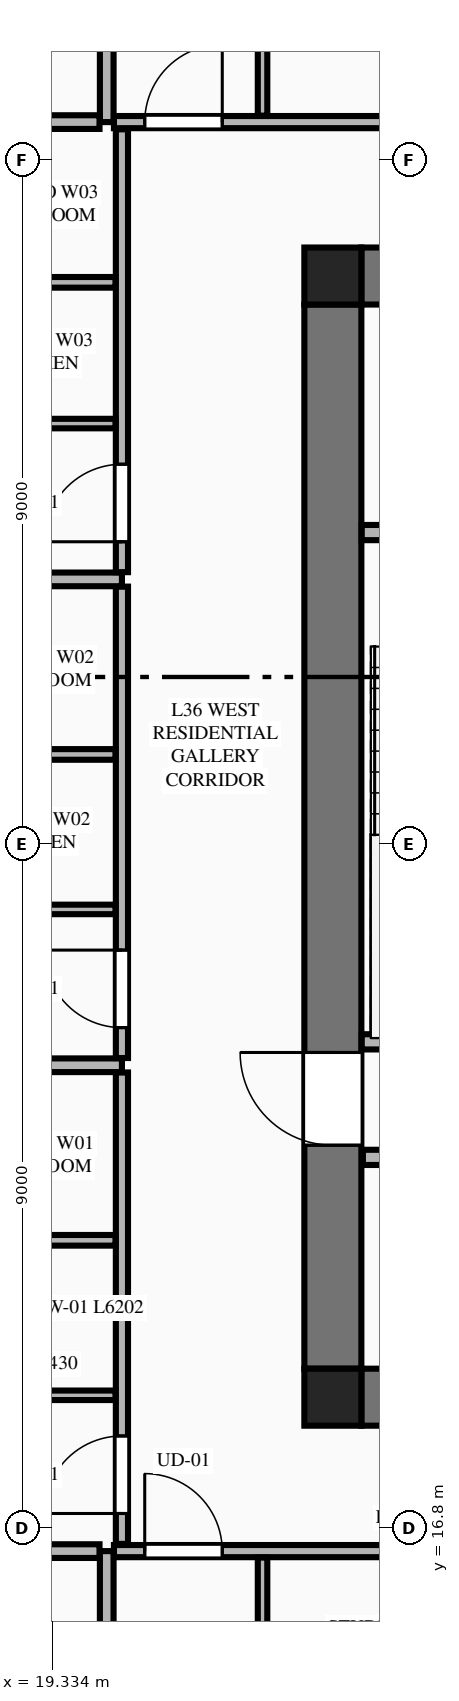
"""IFC4 building model, lengths in metres.
Left out: names, types, materials, properties, quantities, classifications, styles, units other than length and angle.
Written with IfcOpenShell. Run it as: python <this file> out.ifc"""

import sys

from ifc_helpers import new_model, si_unit, direction, frame, frame_2d, origin, origin_2d, place, context, subcontext, project, spatial, rectangle, extrude, element, fill, save


model = new_model("IFC4")
c1 = context("Model", 3, precision=1e-05, world=origin(), true_north=direction((0.0, 1.0)))
c2 = subcontext(c1, "Body", "Model", "MODEL_VIEW")
j1 = project(units=[si_unit("LENGTHUNIT", "METRE"), si_unit("PLANEANGLEUNIT", "RADIAN")], contexts=[c1])
p1 = place(None, origin())
s1 = spatial("IfcSite", under=j1, at=p1, CompositionType="ELEMENT")
p2 = place(p1, origin())
s2 = spatial("IfcBuilding", under=s1, at=p2, CompositionType="ELEMENT")
p3 = place(p2, frame((0.0, 0.0, 137.45)))
s3 = spatial("IfcBuildingStorey", under=s2, at=p3, CompositionType="ELEMENT", Elevation=137.45)
for number, where, z_axis, x_axis in (
    (1, (23.025, 18.525, 0.0), (0.0, 0.0, 1.0), (1.0, 0.0, 0.0)),
    (2, (23.025, 33.275, 0.0), (0.0, 0.0, 1.0), (1.0, 0.0, 0.0)),
):
    element("IfcColumn", number, at=place(p3, frame(where, z_axis=z_axis, x_axis=x_axis)), inside=s3, PredefinedType="COLUMN", context=c2, shape_type="SweptSolid", body=[
        extrude(rectangle(XDim=0.75, YDim=0.75, at=origin_2d()), origin(), (0.0, 0.0, 1.0), 3.55),
    ])
for number, where, z_axis, x_axis in (
    (3, (23.4, 18.525, 0.0), (0.0, 0.0, 1.0), (1.0, 0.0, 0.0)),
    (4, (23.4, 33.275, 0.0), (0.0, 0.0, 1.0), (1.0, 0.0, 0.0)),
):
    element("IfcWall", number, at=place(p3, frame(where, z_axis=z_axis, x_axis=x_axis)), inside=s3, PredefinedType="SHEAR", context=c2, shape_type="SweptSolid", body=[
        extrude(rectangle(XDim=18.0, YDim=0.75, at=frame_2d((9.0, 0.0))), origin(), (0.0, 0.0, 1.0), 3.34),
    ])
p4 = place(p3, frame((23.025, 18.9, 0.0), z_axis=(0.0, 0.0, 1.0), x_axis=(0.0, 1.0, 0.0)))
e5 = element("IfcWall", 5, at=p4, inside=s3, PredefinedType="SHEAR", context=c2, shape_type="SweptSolid", body=[
    extrude(rectangle(XDim=14.0, YDim=0.75, at=frame_2d((7.0, 0.0))), origin(), (0.0, 0.0, 1.0), 3.34),
])
p5 = place(p4, frame((2.94, 0.0, 0.0)))
e6 = element("IfcOpeningElement", 6, at=p5, cuts=e5, PredefinedType="OPENING", context=c2, shape_type="SweptSolid", body=[
    extrude(rectangle(XDim=1.22, YDim=2.25, at=frame_2d((0.61, 1.125))), frame((0.0, 0.385, 0.0), z_axis=(0.0, -1.0, 0.0), x_axis=(1.0, 0.0, 0.0)), (0.0, 0.0, 1.0), 0.77),
])
p6 = place(p3, frame((23.405, 23.2, 0.0), z_axis=(0.0, 0.0, 1.0), x_axis=(1.0, 0.0, 0.0)))
e7 = element("IfcWall", 7, at=p6, inside=s3, PredefinedType="PLUMBINGWALL", context=c2, shape_type="SweptSolid", body=[
    extrude(rectangle(XDim=3.27, YDim=0.2, at=frame_2d((1.635, 0.0))), origin(), (0.0, 0.0, 1.0), 3.34),
])
p7 = place(p3, frame((23.405, 29.9, 0.0), z_axis=(0.0, 0.0, 1.0), x_axis=(1.0, 0.0, 0.0)))
e8 = element("IfcWall", 8, at=p7, inside=s3, PredefinedType="PLUMBINGWALL", context=c2, shape_type="SweptSolid", body=[
    extrude(rectangle(XDim=3.27, YDim=0.2, at=frame_2d((1.635, 0.0))), origin(), (0.0, 0.0, 1.0), 3.34),
])
p8 = place(p7, frame((1.85, 0.0, 0.0)))
e9 = element("IfcOpeningElement", 9, at=p8, cuts=e8, PredefinedType="OPENING", context=c2, shape_type="SweptSolid", body=[
    extrude(rectangle(XDim=0.85, YDim=2.05, at=frame_2d((0.425, 1.025))), frame((0.0, 0.11, 0.0), z_axis=(0.0, -1.0, 0.0), x_axis=(1.0, 0.0, 0.0)), (0.0, 0.0, 1.0), 0.22),
])
p9 = place(p3, frame((23.42, 21.68, 0.0), z_axis=(0.0, 0.0, 1.0), x_axis=(1.0, 0.0, 0.0)))
e10 = element("IfcWall", 10, at=p9, inside=s3, PredefinedType="PLUMBINGWALL", context=c2, shape_type="SweptSolid", body=[
    extrude(rectangle(XDim=17.96, YDim=0.2, at=frame_2d((8.98, 0.0))), origin(), (0.0, 0.0, 1.0), 3.34),
])
p10 = place(p9, frame((11.6, 0.0, 0.0)))
e11 = element("IfcOpeningElement", 11, at=p10, cuts=e10, PredefinedType="OPENING", context=c2, shape_type="SweptSolid", body=[
    extrude(rectangle(XDim=1.1, YDim=2.2, at=frame_2d((0.55, 1.1))), frame((0.0, 0.11, 0.0), z_axis=(0.0, -1.0, 0.0), x_axis=(1.0, 0.0, 0.0)), (0.0, 0.0, 1.0), 0.22),
])
p11 = place(p9, frame((0.41, 0.0, 0.0)))
e12 = element("IfcOpeningElement", 12, at=p11, cuts=e10, PredefinedType="OPENING", context=c2, shape_type="SweptSolid", body=[
    extrude(rectangle(XDim=0.85, YDim=2.05, at=frame_2d((0.425, 1.025))), frame((0.0, 0.11, 0.0), z_axis=(0.0, -1.0, 0.0), x_axis=(1.0, 0.0, 0.0)), (0.0, 0.0, 1.0), 0.22),
])
p12 = place(p9, frame((6.03, 0.0, 0.0)))
e13 = element("IfcOpeningElement", 13, at=p12, cuts=e10, PredefinedType="OPENING", context=c2, shape_type="SweptSolid", body=[
    extrude(rectangle(XDim=0.85, YDim=2.05, at=frame_2d((0.425, 1.025))), frame((0.0, 0.11, 0.0), z_axis=(0.0, -1.0, 0.0), x_axis=(1.0, 0.0, 0.0)), (0.0, 0.0, 1.0), 0.22),
])
p13 = place(p9, frame((13.78, 0.0, 0.0)))
e14 = element("IfcOpeningElement", 14, at=p13, cuts=e10, PredefinedType="OPENING", context=c2, shape_type="SweptSolid", body=[
    extrude(rectangle(XDim=0.85, YDim=2.05, at=frame_2d((0.425, 1.025))), frame((0.0, 0.11, 0.0), z_axis=(0.0, -1.0, 0.0), x_axis=(1.0, 0.0, 0.0)), (0.0, 0.0, 1.0), 0.22),
])
p14 = place(p3, frame((20.05, 4.105, 0.0), z_axis=(0.0, 0.0, 1.0), x_axis=(0.0, 1.0, 0.0)))
e15 = element("IfcWall", 15, at=p14, inside=s3, PredefinedType="PARTITIONING", context=c2, shape_type="SweptSolid", body=[
    extrude(rectangle(XDim=12.395, YDim=0.18, at=frame_2d((6.198, 0.0))), origin(), (0.0, 0.0, 1.0), 3.34),
])
p15 = place(p3, frame((20.145, 16.5, 0.0), z_axis=(0.0, 0.0, 1.0), x_axis=(1.0, 0.0, 0.0)))
e16 = element("IfcWall", 16, at=p15, inside=s3, PredefinedType="PARTITIONING", context=c2, shape_type="SweptSolid", body=[
    extrude(rectangle(XDim=8.328, YDim=0.16, at=frame_2d((4.164, 0.0))), origin(), (0.0, 0.0, 1.0), 3.34),
])
p16 = place(p15, frame((0.405, 0.0, 0.0)))
e17 = element("IfcOpeningElement", 17, at=p16, cuts=e16, PredefinedType="OPENING", context=c2, shape_type="SweptSolid", body=[
    extrude(rectangle(XDim=1.02, YDim=2.25, at=frame_2d((0.51, 1.125))), frame((0.0, 0.09, 0.0), z_axis=(0.0, -1.0, 0.0), x_axis=(1.0, 0.0, 0.0)), (0.0, 0.0, 1.0), 0.18),
])
p17 = place(p3, frame((22.1, 12.887, 0.0), z_axis=(0.0, 0.0, 1.0), x_axis=(0.0, 1.0, 0.0)))
e18 = element("IfcWall", 18, at=p17, inside=s3, PredefinedType="PARTITIONING", context=c2, shape_type="SweptSolid", body=[
    extrude(rectangle(XDim=3.528, YDim=0.125, at=frame_2d((1.764, 0.0))), origin(), (0.0, 0.0, 1.0), 2.722),
])
p18 = place(p3, frame((20.05, 35.3, 0.0), z_axis=(0.0, 0.0, 1.0), x_axis=(0.0, 1.0, 0.0)))
e19 = element("IfcWall", 19, at=p18, inside=s3, PredefinedType="PARTITIONING", context=c2, shape_type="SweptSolid", body=[
    extrude(rectangle(XDim=12.195, YDim=0.18, at=frame_2d((6.098, 0.0))), origin(), (0.0, 0.0, 1.0), 3.34),
])
p19 = place(p3, frame((20.145, 35.3, 0.0), z_axis=(0.0, 0.0, 1.0), x_axis=(1.0, 0.0, 0.0)))
e20 = element("IfcWall", 20, at=p19, inside=s3, PredefinedType="PARTITIONING", context=c2, shape_type="SweptSolid", body=[
    extrude(rectangle(XDim=8.328, YDim=0.16, at=frame_2d((4.164, 0.0))), origin(), (0.0, 0.0, 1.0), 3.34),
])
p20 = place(p19, frame((0.405, 0.0, 0.0)))
e21 = element("IfcOpeningElement", 21, at=p20, cuts=e20, PredefinedType="OPENING", context=c2, shape_type="SweptSolid", body=[
    extrude(rectangle(XDim=1.02, YDim=2.25, at=frame_2d((0.51, 1.125))), frame((0.0, 0.09, 0.0), z_axis=(0.0, -1.0, 0.0), x_axis=(1.0, 0.0, 0.0)), (0.0, 0.0, 1.0), 0.18),
])
p21 = place(p3, frame((22.1, 35.385, 0.0), z_axis=(0.0, 0.0, 1.0), x_axis=(0.0, 1.0, 0.0)))
e22 = element("IfcWall", 22, at=p21, inside=s3, PredefinedType="PARTITIONING", context=c2, shape_type="SweptSolid", body=[
    extrude(rectangle(XDim=6.151, YDim=0.125, at=frame_2d((3.075, 0.0))), origin(), (0.0, 0.0, 1.0), 2.722),
])
p22 = place(p3, frame((12.185, 16.5, 0.0), z_axis=(0.0, 0.0, 1.0), x_axis=(1.0, 0.0, 0.0)))
e23 = element("IfcWall", 23, at=p22, inside=s3, PredefinedType="PARTITIONING", context=c2, shape_type="SweptSolid", body=[
    extrude(rectangle(XDim=7.77, YDim=0.18, at=frame_2d((3.885, 0.0))), origin(), (0.0, 0.0, 1.0), 3.34),
])
p23 = place(p3, frame((12.286, 35.3, 0.0), z_axis=(0.0, 0.0, 1.0), x_axis=(1.0, 0.0, 0.0)))
e24 = element("IfcWall", 24, at=p23, inside=s3, PredefinedType="PARTITIONING", context=c2, shape_type="SweptSolid", body=[
    extrude(rectangle(XDim=7.669, YDim=0.18, at=frame_2d((3.834, 0.0))), origin(), (0.0, 0.0, 1.0), 3.34),
])
p24 = place(p3, frame((20.25, 16.595, 0.0), z_axis=(0.0, 0.0, 1.0), x_axis=(0.0, 1.0, 0.0)))
e25 = element("IfcWall", 25, at=p24, inside=s3, PredefinedType="PARTITIONING", context=c2, shape_type="SweptSolid", body=[
    extrude(rectangle(XDim=6.202, YDim=0.16, at=frame_2d((3.101, 0.0))), origin(), (0.0, 0.0, 1.0), 3.34),
])
p25 = place(p24, frame((0.4, 0.0, 0.0)))
e26 = element("IfcOpeningElement", 26, at=p25, cuts=e25, PredefinedType="OPENING", context=c2, shape_type="SweptSolid", body=[
    extrude(rectangle(XDim=1.02, YDim=2.25, at=frame_2d((0.51, 1.125))), frame((0.0, 0.09, 0.0), z_axis=(0.0, -1.0, 0.0), x_axis=(1.0, 0.0, 0.0)), (0.0, 0.0, 1.0), 0.18),
])
p26 = place(p3, frame((17.735, 18.55, 0.0), z_axis=(0.0, 0.0, 1.0), x_axis=(1.0, 0.0, 0.0)))
e27 = element("IfcWall", 27, at=p26, inside=s3, PredefinedType="PARTITIONING", context=c2, shape_type="SweptSolid", body=[
    extrude(rectangle(XDim=2.43, YDim=0.125, at=frame_2d((1.215, 0.0))), origin(), (0.0, 0.0, 1.0), 2.722),
])
p27 = place(p3, frame((17.735, 20.589, 0.0), z_axis=(0.0, 0.0, 1.0), x_axis=(1.0, 0.0, 0.0)))
e28 = element("IfcWall", 28, at=p27, inside=s3, PredefinedType="PLUMBINGWALL", context=c2, shape_type="SweptSolid", body=[
    extrude(rectangle(XDim=2.43, YDim=0.14, at=frame_2d((1.215, 0.0))), origin(), (0.0, 0.0, 1.0), 3.34),
])
p28 = place(p3, frame((8.951, 22.892, 0.0), z_axis=(0.0, 0.0, 1.0), x_axis=(1.0, 0.0, 0.0)))
e29 = element("IfcWall", 29, at=p28, inside=s3, PredefinedType="PARTITIONING", context=c2, shape_type="SweptSolid", body=[
    extrude(rectangle(XDim=11.299, YDim=0.18, at=frame_2d((5.649, 0.0))), origin(), (0.0, 0.0, 1.0), 3.34),
])
p29 = place(p3, frame((20.25, 22.987, 0.0), z_axis=(0.0, 0.0, 1.0), x_axis=(0.0, 1.0, 0.0)))
e30 = element("IfcWall", 30, at=p29, inside=s3, PredefinedType="PARTITIONING", context=c2, shape_type="SweptSolid", body=[
    extrude(rectangle(XDim=6.202, YDim=0.16, at=frame_2d((3.101, 0.0))), origin(), (0.0, 0.0, 1.0), 3.34),
])
p30 = place(p29, frame((0.4, 0.0, 0.0)))
e31 = element("IfcOpeningElement", 31, at=p30, cuts=e30, PredefinedType="OPENING", context=c2, shape_type="SweptSolid", body=[
    extrude(rectangle(XDim=1.02, YDim=2.25, at=frame_2d((0.51, 1.125))), frame((0.0, 0.09, 0.0), z_axis=(0.0, -1.0, 0.0), x_axis=(1.0, 0.0, 0.0)), (0.0, 0.0, 1.0), 0.18),
])
p31 = place(p3, frame((17.735, 24.942, 0.0), z_axis=(0.0, 0.0, 1.0), x_axis=(1.0, 0.0, 0.0)))
e32 = element("IfcWall", 32, at=p31, inside=s3, PredefinedType="PARTITIONING", context=c2, shape_type="SweptSolid", body=[
    extrude(rectangle(XDim=2.43, YDim=0.125, at=frame_2d((1.215, 0.0))), origin(), (0.0, 0.0, 1.0), 3.34),
])
p32 = place(p3, frame((17.735, 26.981, 0.0), z_axis=(0.0, 0.0, 1.0), x_axis=(1.0, 0.0, 0.0)))
e33 = element("IfcWall", 33, at=p32, inside=s3, PredefinedType="PLUMBINGWALL", context=c2, shape_type="SweptSolid", body=[
    extrude(rectangle(XDim=2.43, YDim=0.14, at=frame_2d((1.215, 0.0))), origin(), (0.0, 0.0, 1.0), 3.34),
])
p33 = place(p3, frame((9.242, 29.284, 0.0), z_axis=(0.0, 0.0, 1.0), x_axis=(1.0, 0.0, 0.0)))
e34 = element("IfcWall", 34, at=p33, inside=s3, PredefinedType="PARTITIONING", context=c2, shape_type="SweptSolid", body=[
    extrude(rectangle(XDim=11.008, YDim=0.18, at=frame_2d((5.504, 0.0))), origin(), (0.0, 0.0, 1.0), 3.34),
])
p34 = place(p3, frame((20.25, 29.379, 0.0), z_axis=(0.0, 0.0, 1.0), x_axis=(0.0, 1.0, 0.0)))
e35 = element("IfcWall", 35, at=p34, inside=s3, PredefinedType="PARTITIONING", context=c2, shape_type="SweptSolid", body=[
    extrude(rectangle(XDim=5.826, YDim=0.16, at=frame_2d((2.913, 0.0))), origin(), (0.0, 0.0, 1.0), 3.34),
])
p35 = place(p34, frame((0.4, 0.0, 0.0)))
e36 = element("IfcOpeningElement", 36, at=p35, cuts=e35, PredefinedType="OPENING", context=c2, shape_type="SweptSolid", body=[
    extrude(rectangle(XDim=1.02, YDim=2.25, at=frame_2d((0.51, 1.125))), frame((0.0, 0.09, 0.0), z_axis=(0.0, -1.0, 0.0), x_axis=(1.0, 0.0, 0.0)), (0.0, 0.0, 1.0), 0.18),
])
p36 = place(p3, frame((17.735, 31.334, 0.0), z_axis=(0.0, 0.0, 1.0), x_axis=(1.0, 0.0, 0.0)))
e37 = element("IfcWall", 37, at=p36, inside=s3, PredefinedType="PARTITIONING", context=c2, shape_type="SweptSolid", body=[
    extrude(rectangle(XDim=2.43, YDim=0.125, at=frame_2d((1.215, 0.0))), origin(), (0.0, 0.0, 1.0), 3.34),
])
p37 = place(p3, frame((17.735, 33.192, 0.0), z_axis=(0.0, 0.0, 1.0), x_axis=(1.0, 0.0, 0.0)))
e38 = element("IfcWall", 38, at=p37, inside=s3, PredefinedType="PLUMBINGWALL", context=c2, shape_type="SweptSolid", body=[
    extrude(rectangle(XDim=2.43, YDim=0.14, at=frame_2d((1.215, 0.0))), origin(), (0.0, 0.0, 1.0), 2.722),
])
p38 = place(p5, origin())
e39 = element("IfcDoor", 39, at=p38, inside=s3, OperationType="SINGLE_SWING_RIGHT", PredefinedType="DOOR", context=c2, shape_type="SweptSolid", body=[
    extrude(rectangle(XDim=1.22, YDim=2.25, at=frame_2d((0.61, 1.125))), frame((0.0, 0.025, 0.0), z_axis=(0.0, -1.0, 0.0), x_axis=(1.0, 0.0, 0.0)), (0.0, 0.0, 1.0), 0.05),
])
fill(e6, e39)
p39 = place(p16, origin())
e40 = element("IfcDoor", 40, at=p39, inside=s3, OperationType="SINGLE_SWING_LEFT", PredefinedType="DOOR", context=c2, shape_type="SweptSolid", body=[
    extrude(rectangle(XDim=1.02, YDim=2.25, at=frame_2d((0.51, 1.125))), frame((0.0, 0.025, 0.0), z_axis=(0.0, -1.0, 0.0), x_axis=(1.0, 0.0, 0.0)), (0.0, 0.0, 1.0), 0.05),
])
fill(e17, e40)
p40 = place(p20, origin())
e41 = element("IfcDoor", 41, at=p40, inside=s3, OperationType="SINGLE_SWING_RIGHT", PredefinedType="DOOR", context=c2, shape_type="SweptSolid", body=[
    extrude(rectangle(XDim=1.02, YDim=2.25, at=frame_2d((0.51, 1.125))), frame((0.0, 0.025, 0.0), z_axis=(0.0, -1.0, 0.0), x_axis=(1.0, 0.0, 0.0)), (0.0, 0.0, 1.0), 0.05),
])
fill(e21, e41)
p41 = place(p25, origin())
e42 = element("IfcDoor", 42, at=p41, inside=s3, OperationType="SINGLE_SWING_LEFT", PredefinedType="DOOR", context=c2, shape_type="SweptSolid", body=[
    extrude(rectangle(XDim=1.02, YDim=2.25, at=frame_2d((0.51, 1.125))), frame((0.0, 0.025, 0.0), z_axis=(0.0, -1.0, 0.0), x_axis=(1.0, 0.0, 0.0)), (0.0, 0.0, 1.0), 0.05),
])
fill(e26, e42)
p42 = place(p30, origin())
e43 = element("IfcDoor", 43, at=p42, inside=s3, OperationType="SINGLE_SWING_RIGHT", PredefinedType="DOOR", context=c2, shape_type="SweptSolid", body=[
    extrude(rectangle(XDim=1.02, YDim=2.25, at=frame_2d((0.51, 1.125))), frame((0.0, 0.025, 0.0), z_axis=(0.0, -1.0, 0.0), x_axis=(1.0, 0.0, 0.0)), (0.0, 0.0, 1.0), 0.05),
])
fill(e31, e43)
p43 = place(p35, origin())
e44 = element("IfcDoor", 44, at=p43, inside=s3, OperationType="SINGLE_SWING_LEFT", PredefinedType="DOOR", context=c2, shape_type="SweptSolid", body=[
    extrude(rectangle(XDim=1.02, YDim=2.25, at=frame_2d((0.51, 1.125))), frame((0.0, 0.025, 0.0), z_axis=(0.0, -1.0, 0.0), x_axis=(1.0, 0.0, 0.0)), (0.0, 0.0, 1.0), 0.05),
])
fill(e36, e44)
save(model, sys.argv[1])
